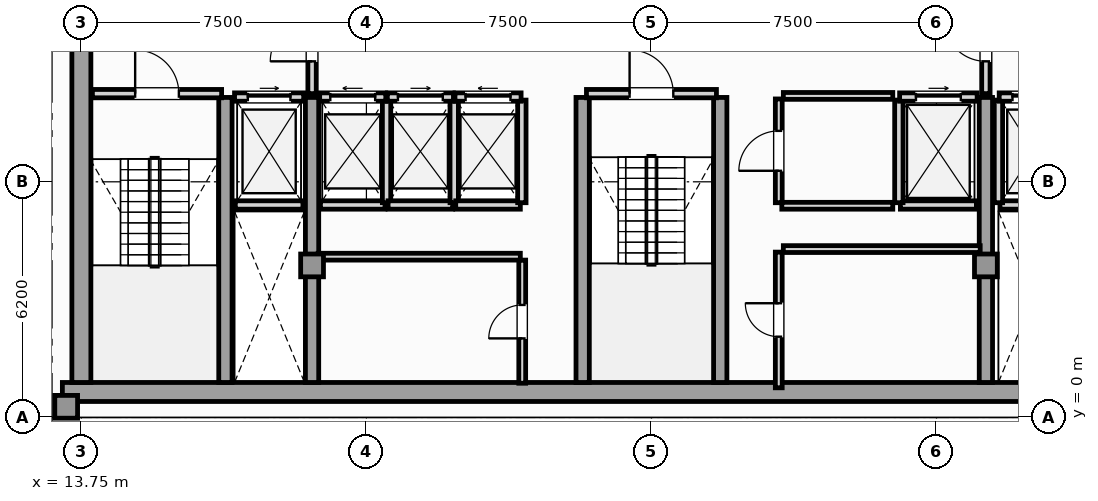
"""IFC4 building model, lengths in metres.
Left out: names, types, materials, properties, quantities, classifications, styles, units other than length and angle.
Written with IfcOpenShell. Run it as: python <this file> out.ifc"""

import sys

from ifc_helpers import new_model, si_unit, direction, frame, frame_2d, origin, origin_2d, place, context, subcontext, project, spatial, rectangle, extrude, element, fill, save


model = new_model("IFC4")
c1 = context("Model", 3, precision=1e-05, world=origin(), true_north=direction((0.0, 1.0)))
c2 = subcontext(c1, "Body", "Model", "MODEL_VIEW")
j1 = project(units=[si_unit("LENGTHUNIT", "METRE"), si_unit("PLANEANGLEUNIT", "RADIAN")], contexts=[c1])
p1 = place(None, origin())
s1 = spatial("IfcSite", under=j1, at=p1, CompositionType="ELEMENT")
p2 = place(p1, origin())
s2 = spatial("IfcBuilding", under=s1, at=p2, CompositionType="ELEMENT")
p3 = place(p2, frame((0.0, 0.0, 345.2)))
s3 = spatial("IfcBuildingStorey", under=s2, at=p3, CompositionType="ELEMENT", Elevation=345.2)
p4 = place(p3, frame((13.25, 0.67, 0.0), z_axis=(0.0, 0.0, 1.0), x_axis=(1.0, 0.0, 0.0)))
e1 = element("IfcWall", 1, at=p4, inside=s3, PredefinedType="SHEAR", context=c2, shape_type="SweptSolid", body=[
    extrude(rectangle(XDim=31.0, YDim=0.5, at=frame_2d((15.5, 0.0))), origin(), (0.0, 0.0, 1.0), 3.59),
])
p5 = place(p3, frame((13.75, 0.92, 0.0), z_axis=(0.0, 0.0, 1.0), x_axis=(0.0, 1.0, 0.0)))
e2 = element("IfcWall", 2, at=p5, inside=s3, PredefinedType="SHEAR", context=c2, shape_type="SweptSolid", body=[
    extrude(rectangle(XDim=10.53, YDim=0.5, at=frame_2d((5.265, 0.0))), origin(), (0.0, 0.0, 1.0), 3.59),
])
for number, where, z_axis, x_axis in (
    (3, (17.54, 0.92, 0.0), (0.0, 0.0, 1.0), (0.0, 1.0, 0.0)),
    (4, (19.82, 0.92, 0.0), (0.0, 0.0, 1.0), (0.0, 1.0, 0.0)),
    (5, (26.94, 0.92, 0.0), (0.0, 0.0, 1.0), (0.0, 1.0, 0.0)),
    (6, (30.56, 0.92, 0.0), (0.0, 0.0, 1.0), (0.0, 1.0, 0.0)),
    (7, (37.55, 0.92, 0.0), (0.0, 0.0, 1.0), (0.0, 1.0, 0.0)),
):
    element("IfcWall", number, at=place(p3, frame(where, z_axis=z_axis, x_axis=x_axis)), inside=s3, PredefinedType="SHEAR", context=c2, shape_type="SweptSolid", body=[
        extrude(rectangle(XDim=7.5, YDim=0.35, at=frame_2d((3.75, 0.0))), origin(), (0.0, 0.0, 1.0), 3.59),
    ])
for number, where, z_axis, x_axis in (
    (8, (13.35, 0.28, 0.0), (0.0, 0.0, 1.0), (1.0, 0.0, 0.0)),
    (9, (19.82, 4.0, 0.0), (0.0, 0.0, 1.0), (1.0, 0.0, 0.0)),
    (10, (37.55, 4.0, 0.0), (0.0, 0.0, 1.0), (1.0, 0.0, 0.0)),
):
    element("IfcColumn", number, at=place(p3, frame(where, z_axis=z_axis, x_axis=x_axis)), inside=s3, PredefinedType="COLUMN", context=c2, shape_type="SweptSolid", body=[
        extrude(rectangle(XDim=0.6, YDim=0.6, at=origin_2d()), origin(), (0.0, 0.0, 1.0), 3.85),
    ])
p6 = place(p3, frame((17.8, 5.59, 0.0), z_axis=(0.0, 0.0, 1.0), x_axis=(1.0, 0.0, 0.0)))
e11 = element("IfcWall", 11, at=p6, inside=s3, PredefinedType="SOLIDWALL", context=c2, shape_type="SweptSolid", body=[
    extrude(rectangle(XDim=1.78, YDim=0.22, at=frame_2d((0.89, 0.0))), origin(), (0.0, 0.0, 1.0), 3.59),
])
p7 = place(p3, frame((17.78, 8.43, 0.0), z_axis=(0.0, 0.0, 1.0), x_axis=(1.0, 0.0, 0.0)))
e12 = element("IfcWall", 12, at=p7, inside=s3, PredefinedType="SOLIDWALL", context=c2, shape_type="SweptSolid", body=[
    extrude(rectangle(XDim=1.82, YDim=0.22, at=frame_2d((0.91, 0.0))), origin(), (0.0, 0.0, 1.0), 3.59),
])
p8 = place(p7, frame((0.35, 0.0, 0.0)))
e13 = element("IfcOpeningElement", 13, at=p8, cuts=e12, PredefinedType="OPENING", context=c2, shape_type="SweptSolid", body=[
    extrude(rectangle(XDim=1.12, YDim=2.25, at=frame_2d((0.56, 1.125))), frame((0.0, 0.12, 0.0), z_axis=(0.0, -1.0, 0.0), x_axis=(1.0, 0.0, 0.0)), (0.0, 0.0, 1.0), 0.24),
])
p9 = place(p3, frame((37.92, 5.59, 0.0), z_axis=(0.0, 0.0, 1.0), x_axis=(1.0, 0.0, 0.0)))
e14 = element("IfcWall", 14, at=p9, inside=s3, PredefinedType="SOLIDWALL", context=c2, shape_type="SweptSolid", body=[
    extrude(rectangle(XDim=1.78, YDim=0.22, at=frame_2d((0.89, 0.0))), origin(), (0.0, 0.0, 1.0), 3.59),
])
p10 = place(p3, frame((37.88, 5.65, 0.0), z_axis=(0.0, 0.0, 1.0), x_axis=(0.0, 1.0, 0.0)))
e15 = element("IfcWall", 15, at=p10, inside=s3, PredefinedType="SOLIDWALL", context=c2, shape_type="SweptSolid", body=[
    extrude(rectangle(XDim=2.7, YDim=0.22, at=frame_2d((1.35, 0.0))), origin(), (0.0, 0.0, 1.0), 3.59),
])
p11 = place(p3, frame((37.9, 8.43, 0.0), z_axis=(0.0, 0.0, 1.0), x_axis=(1.0, 0.0, 0.0)))
e16 = element("IfcWall", 16, at=p11, inside=s3, PredefinedType="SOLIDWALL", context=c2, shape_type="SweptSolid", body=[
    extrude(rectangle(XDim=1.82, YDim=0.22, at=frame_2d((0.91, 0.0))), origin(), (0.0, 0.0, 1.0), 3.59),
])
p12 = place(p11, frame((0.35, 0.0, 0.0)))
e17 = element("IfcOpeningElement", 17, at=p12, cuts=e16, PredefinedType="OPENING", context=c2, shape_type="SweptSolid", body=[
    extrude(rectangle(XDim=1.12, YDim=2.25, at=frame_2d((0.56, 1.125))), frame((0.0, 0.12, 0.0), z_axis=(0.0, -1.0, 0.0), x_axis=(1.0, 0.0, 0.0)), (0.0, 0.0, 1.0), 0.24),
])
p13 = place(p3, frame((35.3, 5.59, 0.0), z_axis=(0.0, 0.0, 1.0), x_axis=(1.0, 0.0, 0.0)))
e18 = element("IfcWall", 18, at=p13, inside=s3, PredefinedType="SOLIDWALL", context=c2, shape_type="SweptSolid", body=[
    extrude(rectangle(XDim=2.0, YDim=0.22, at=frame_2d((1.0, 0.0))), origin(), (0.0, 0.0, 1.0), 3.59),
])
p14 = place(p3, frame((35.26, 5.65, 0.0), z_axis=(0.0, 0.0, 1.0), x_axis=(0.0, 1.0, 0.0)))
e19 = element("IfcWall", 19, at=p14, inside=s3, PredefinedType="SOLIDWALL", context=c2, shape_type="SweptSolid", body=[
    extrude(rectangle(XDim=2.7, YDim=0.22, at=frame_2d((1.35, 0.0))), origin(), (0.0, 0.0, 1.0), 3.59),
])
p15 = place(p3, frame((35.28, 8.43, 0.0), z_axis=(0.0, 0.0, 1.0), x_axis=(1.0, 0.0, 0.0)))
e20 = element("IfcWall", 20, at=p15, inside=s3, PredefinedType="SOLIDWALL", context=c2, shape_type="SweptSolid", body=[
    extrude(rectangle(XDim=2.04, YDim=0.22, at=frame_2d((1.02, 0.0))), origin(), (0.0, 0.0, 1.0), 3.59),
])
p16 = place(p15, frame((0.43, 0.0, 0.0)))
e21 = element("IfcOpeningElement", 21, at=p16, cuts=e20, PredefinedType="OPENING", context=c2, shape_type="SweptSolid", body=[
    extrude(rectangle(XDim=1.18, YDim=2.2, at=frame_2d((0.59, 1.1))), frame((0.0, 0.12, 0.0), z_axis=(0.0, -1.0, 0.0), x_axis=(1.0, 0.0, 0.0)), (0.0, 0.0, 1.0), 0.24),
])
p17 = place(p3, frame((20.04, 5.59, 0.0), z_axis=(0.0, 0.0, 1.0), x_axis=(1.0, 0.0, 0.0)))
e22 = element("IfcWall", 22, at=p17, inside=s3, PredefinedType="SOLIDWALL", context=c2, shape_type="SweptSolid", body=[
    extrude(rectangle(XDim=1.7, YDim=0.22, at=frame_2d((0.85, 0.0))), origin(), (0.0, 0.0, 1.0), 3.59),
])
p18 = place(p3, frame((21.78, 5.65, 0.0), z_axis=(0.0, 0.0, 1.0), x_axis=(0.0, 1.0, 0.0)))
e23 = element("IfcWall", 23, at=p18, inside=s3, PredefinedType="SOLIDWALL", context=c2, shape_type="SweptSolid", body=[
    extrude(rectangle(XDim=2.7, YDim=0.22, at=frame_2d((1.35, 0.0))), origin(), (0.0, 0.0, 1.0), 3.59),
])
p19 = place(p3, frame((20.02, 8.43, 0.0), z_axis=(0.0, 0.0, 1.0), x_axis=(1.0, 0.0, 0.0)))
e24 = element("IfcWall", 24, at=p19, inside=s3, PredefinedType="SOLIDWALL", context=c2, shape_type="SweptSolid", body=[
    extrude(rectangle(XDim=1.74, YDim=0.22, at=frame_2d((0.87, 0.0))), origin(), (0.0, 0.0, 1.0), 3.59),
])
p20 = place(p19, frame((0.28, 0.0, 0.0)))
e25 = element("IfcOpeningElement", 25, at=p20, cuts=e24, PredefinedType="OPENING", context=c2, shape_type="SweptSolid", body=[
    extrude(rectangle(XDim=1.18, YDim=2.2, at=frame_2d((0.59, 1.1))), frame((0.0, 0.12, 0.0), z_axis=(0.0, -1.0, 0.0), x_axis=(1.0, 0.0, 0.0)), (0.0, 0.0, 1.0), 0.24),
])
p21 = place(p3, frame((21.82, 5.59, 0.0), z_axis=(0.0, 0.0, 1.0), x_axis=(1.0, 0.0, 0.0)))
e26 = element("IfcWall", 26, at=p21, inside=s3, PredefinedType="SOLIDWALL", context=c2, shape_type="SweptSolid", body=[
    extrude(rectangle(XDim=1.7, YDim=0.22, at=frame_2d((0.85, 0.0))), origin(), (0.0, 0.0, 1.0), 3.59),
])
p22 = place(p3, frame((23.56, 5.65, 0.0), z_axis=(0.0, 0.0, 1.0), x_axis=(0.0, 1.0, 0.0)))
e27 = element("IfcWall", 27, at=p22, inside=s3, PredefinedType="SOLIDWALL", context=c2, shape_type="SweptSolid", body=[
    extrude(rectangle(XDim=2.7, YDim=0.22, at=frame_2d((1.35, 0.0))), origin(), (0.0, 0.0, 1.0), 3.59),
])
p23 = place(p3, frame((21.8, 8.43, 0.0), z_axis=(0.0, 0.0, 1.0), x_axis=(1.0, 0.0, 0.0)))
e28 = element("IfcWall", 28, at=p23, inside=s3, PredefinedType="SOLIDWALL", context=c2, shape_type="SweptSolid", body=[
    extrude(rectangle(XDim=1.74, YDim=0.22, at=frame_2d((0.87, 0.0))), origin(), (0.0, 0.0, 1.0), 3.59),
])
p24 = place(p23, frame((0.28, 0.0, 0.0)))
e29 = element("IfcOpeningElement", 29, at=p24, cuts=e28, PredefinedType="OPENING", context=c2, shape_type="SweptSolid", body=[
    extrude(rectangle(XDim=1.18, YDim=2.2, at=frame_2d((0.59, 1.1))), frame((0.0, 0.12, 0.0), z_axis=(0.0, -1.0, 0.0), x_axis=(1.0, 0.0, 0.0)), (0.0, 0.0, 1.0), 0.24),
])
p25 = place(p3, frame((23.6, 5.59, 0.0), z_axis=(0.0, 0.0, 1.0), x_axis=(1.0, 0.0, 0.0)))
e30 = element("IfcWall", 30, at=p25, inside=s3, PredefinedType="SOLIDWALL", context=c2, shape_type="SweptSolid", body=[
    extrude(rectangle(XDim=1.7, YDim=0.22, at=frame_2d((0.85, 0.0))), origin(), (0.0, 0.0, 1.0), 3.59),
])
p26 = place(p3, frame((25.34, 5.65, 0.0), z_axis=(0.0, 0.0, 1.0), x_axis=(0.0, 1.0, 0.0)))
e31 = element("IfcWall", 31, at=p26, inside=s3, PredefinedType="SOLIDWALL", context=c2, shape_type="SweptSolid", body=[
    extrude(rectangle(XDim=2.7, YDim=0.22, at=frame_2d((1.35, 0.0))), origin(), (0.0, 0.0, 1.0), 3.59),
])
p27 = place(p3, frame((23.58, 8.43, 0.0), z_axis=(0.0, 0.0, 1.0), x_axis=(1.0, 0.0, 0.0)))
e32 = element("IfcWall", 32, at=p27, inside=s3, PredefinedType="SOLIDWALL", context=c2, shape_type="SweptSolid", body=[
    extrude(rectangle(XDim=1.74, YDim=0.22, at=frame_2d((0.87, 0.0))), origin(), (0.0, 0.0, 1.0), 3.59),
])
p28 = place(p27, frame((0.28, 0.0, 0.0)))
e33 = element("IfcOpeningElement", 33, at=p28, cuts=e32, PredefinedType="OPENING", context=c2, shape_type="SweptSolid", body=[
    extrude(rectangle(XDim=1.18, YDim=2.2, at=frame_2d((0.59, 1.1))), frame((0.0, 0.12, 0.0), z_axis=(0.0, -1.0, 0.0), x_axis=(1.0, 0.0, 0.0)), (0.0, 0.0, 1.0), 0.24),
])
p29 = place(p3, frame((14.04, 8.52, 0.0), z_axis=(0.0, 0.0, 1.0), x_axis=(1.0, 0.0, 0.0)))
e34 = element("IfcWall", 34, at=p29, inside=s3, PredefinedType="SOLIDWALL", context=c2, shape_type="SweptSolid", body=[
    extrude(rectangle(XDim=3.4, YDim=0.22, at=frame_2d((1.7, 0.0))), origin(), (0.0, 0.0, 1.0), 3.59),
])
p30 = place(p29, frame((1.125, 0.0, 0.0)))
e35 = element("IfcOpeningElement", 35, at=p30, cuts=e34, PredefinedType="OPENING", context=c2, shape_type="SweptSolid", body=[
    extrude(rectangle(XDim=1.15, YDim=2.2, at=frame_2d((0.575, 1.1))), frame((0.0, 0.12, 0.0), z_axis=(0.0, -1.0, 0.0), x_axis=(1.0, 0.0, 0.0)), (0.0, 0.0, 1.0), 0.24),
])
p31 = place(p3, frame((27.04, 8.52, 0.0), z_axis=(0.0, 0.0, 1.0), x_axis=(1.0, 0.0, 0.0)))
e36 = element("IfcWall", 36, at=p31, inside=s3, PredefinedType="SOLIDWALL", context=c2, shape_type="SweptSolid", body=[
    extrude(rectangle(XDim=3.42, YDim=0.22, at=frame_2d((1.71, 0.0))), origin(), (0.0, 0.0, 1.0), 3.59),
])
p32 = place(p31, frame((1.135, 0.0, 0.0)))
e37 = element("IfcOpeningElement", 37, at=p32, cuts=e36, PredefinedType="OPENING", context=c2, shape_type="SweptSolid", body=[
    extrude(rectangle(XDim=1.15, YDim=2.2, at=frame_2d((0.575, 1.1))), frame((0.0, 0.12, 0.0), z_axis=(0.0, -1.0, 0.0), x_axis=(1.0, 0.0, 0.0)), (0.0, 0.0, 1.0), 0.24),
])
p33 = place(p3, frame((19.82, 8.52, 0.0), z_axis=(0.0, 0.0, 1.0), x_axis=(0.0, 1.0, 0.0)))
e38 = element("IfcWall", 38, at=p33, inside=s3, PredefinedType="SOLIDWALL", context=c2, shape_type="SweptSolid", body=[
    extrude(rectangle(XDim=2.8, YDim=0.22, at=frame_2d((1.4, 0.0))), origin(), (0.0, 0.0, 1.0), 3.046),
])
p34 = place(p33, frame((0.85, 0.0, 0.0)))
e39 = element("IfcOpeningElement", 39, at=p34, cuts=e38, PredefinedType="OPENING", context=c2, shape_type="SweptSolid", body=[
    extrude(rectangle(XDim=1.1, YDim=2.2, at=frame_2d((0.55, 1.1))), frame((0.0, 0.12, 0.0), z_axis=(0.0, -1.0, 0.0), x_axis=(1.0, 0.0, 0.0)), (0.0, 0.0, 1.0), 0.24),
])
p35 = place(p3, frame((37.55, 8.52, 0.0), z_axis=(0.0, 0.0, 1.0), x_axis=(0.0, 1.0, 0.0)))
e40 = element("IfcWall", 40, at=p35, inside=s3, PredefinedType="SOLIDWALL", context=c2, shape_type="SweptSolid", body=[
    extrude(rectangle(XDim=2.8, YDim=0.22, at=frame_2d((1.4, 0.0))), origin(), (0.0, 0.0, 1.0), 3.046),
])
p36 = place(p35, frame((0.85, 0.0, 0.0)))
e41 = element("IfcOpeningElement", 41, at=p36, cuts=e40, PredefinedType="OPENING", context=c2, shape_type="SweptSolid", body=[
    extrude(rectangle(XDim=1.1, YDim=2.2, at=frame_2d((0.55, 1.1))), frame((0.0, 0.12, 0.0), z_axis=(0.0, -1.0, 0.0), x_axis=(1.0, 0.0, 0.0)), (0.0, 0.0, 1.0), 0.24),
])
p37 = place(p3, frame((25.35, 0.9, 0.0), z_axis=(0.0, 0.0, 1.0), x_axis=(0.0, 1.0, 0.0)))
e42 = element("IfcWall", 42, at=p37, inside=s3, PredefinedType="PARTITIONING", context=c2, shape_type="SweptSolid", body=[
    extrude(rectangle(XDim=3.24, YDim=0.18, at=frame_2d((1.62, 0.0))), origin(), (0.0, 0.0, 1.0), 3.59),
])
p38 = place(p37, frame((1.18, 0.0, 0.0)))
e43 = element("IfcOpeningElement", 43, at=p38, cuts=e42, PredefinedType="OPENING", context=c2, shape_type="SweptSolid", body=[
    extrude(rectangle(XDim=0.88, YDim=2.05, at=frame_2d((0.44, 1.025))), frame((0.0, 0.1, 0.0), z_axis=(0.0, -1.0, 0.0), x_axis=(1.0, 0.0, 0.0)), (0.0, 0.0, 1.0), 0.2),
])
p39 = place(p3, frame((19.98, 4.23, 0.0), z_axis=(0.0, 0.0, 1.0), x_axis=(1.0, 0.0, 0.0)))
e44 = element("IfcWall", 44, at=p39, inside=s3, PredefinedType="PARTITIONING", context=c2, shape_type="SweptSolid", body=[
    extrude(rectangle(XDim=5.32, YDim=0.18, at=frame_2d((2.66, 0.0))), origin(), (0.0, 0.0, 1.0), 3.59),
])
p40 = place(p3, frame((32.1, 0.78, 0.0), z_axis=(0.0, 0.0, 1.0), x_axis=(0.0, 1.0, 0.0)))
e45 = element("IfcWall", 45, at=p40, inside=s3, PredefinedType="PARTITIONING", context=c2, shape_type="SweptSolid", body=[
    extrude(rectangle(XDim=3.57, YDim=0.18, at=frame_2d((1.785, 0.0))), origin(), (0.0, 0.0, 1.0), 3.59),
])
p41 = place(p40, frame((1.345, 0.0, 0.0)))
e46 = element("IfcOpeningElement", 46, at=p41, cuts=e45, PredefinedType="OPENING", context=c2, shape_type="SweptSolid", body=[
    extrude(rectangle(XDim=0.88, YDim=2.05, at=frame_2d((0.44, 1.025))), frame((0.0, 0.1, 0.0), z_axis=(0.0, -1.0, 0.0), x_axis=(1.0, 0.0, 0.0)), (0.0, 0.0, 1.0), 0.2),
])
p42 = place(p3, frame((32.22, 4.43, 0.0), z_axis=(0.0, 0.0, 1.0), x_axis=(1.0, 0.0, 0.0)))
e47 = element("IfcWall", 47, at=p42, inside=s3, PredefinedType="PARTITIONING", context=c2, shape_type="SweptSolid", body=[
    extrude(rectangle(XDim=5.18, YDim=0.18, at=frame_2d((2.59, 0.0))), origin(), (0.0, 0.0, 1.0), 3.59),
])
p43 = place(p3, frame((32.1, 5.65, 0.0), z_axis=(0.0, 0.0, 1.0), x_axis=(0.0, 1.0, 0.0)))
e48 = element("IfcWall", 48, at=p43, inside=s3, PredefinedType="PARTITIONING", context=c2, shape_type="SweptSolid", body=[
    extrude(rectangle(XDim=2.73, YDim=0.18, at=frame_2d((1.365, 0.0))), origin(), (0.0, 0.0, 1.0), 3.59),
])
p44 = place(p43, frame((0.84, 0.0, 0.0)))
e49 = element("IfcOpeningElement", 49, at=p44, cuts=e48, PredefinedType="OPENING", context=c2, shape_type="SweptSolid", body=[
    extrude(rectangle(XDim=1.05, YDim=2.15, at=frame_2d((0.525, 1.075))), frame((0.0, 0.1, 0.0), z_axis=(0.0, -1.0, 0.0), x_axis=(1.0, 0.0, 0.0)), (0.0, 0.0, 1.0), 0.2),
])
p45 = place(p3, frame((32.22, 8.46, 0.0), z_axis=(0.0, 0.0, 1.0), x_axis=(1.0, 0.0, 0.0)))
e50 = element("IfcWall", 50, at=p45, inside=s3, PredefinedType="PARTITIONING", context=c2, shape_type="SweptSolid", body=[
    extrude(rectangle(XDim=2.88, YDim=0.18, at=frame_2d((1.44, 0.0))), origin(), (0.0, 0.0, 1.0), 3.59),
])
p46 = place(p3, frame((32.18, 5.57, 0.0), z_axis=(0.0, 0.0, 1.0), x_axis=(1.0, 0.0, 0.0)))
e51 = element("IfcWall", 51, at=p46, inside=s3, PredefinedType="PARTITIONING", context=c2, shape_type="SweptSolid", body=[
    extrude(rectangle(XDim=2.92, YDim=0.18, at=frame_2d((1.46, 0.0))), origin(), (0.0, 0.0, 1.0), 3.59),
])
p47 = place(p8, origin())
e52 = element("IfcDoor", 52, at=p47, inside=s3, OperationType="SLIDING_TO_RIGHT", PredefinedType="DOOR", context=c2, shape_type="SweptSolid", body=[
    extrude(rectangle(XDim=1.12, YDim=2.25, at=frame_2d((0.56, 1.125))), frame((0.0, 0.025, 0.0), z_axis=(0.0, -1.0, 0.0), x_axis=(1.0, 0.0, 0.0)), (0.0, 0.0, 1.0), 0.05),
])
fill(e13, e52)
p48 = place(p12, origin())
e53 = element("IfcDoor", 53, at=p48, inside=s3, OperationType="SLIDING_TO_LEFT", PredefinedType="DOOR", context=c2, shape_type="SweptSolid", body=[
    extrude(rectangle(XDim=1.12, YDim=2.25, at=frame_2d((0.56, 1.125))), frame((0.0, 0.025, 0.0), z_axis=(0.0, -1.0, 0.0), x_axis=(1.0, 0.0, 0.0)), (0.0, 0.0, 1.0), 0.05),
])
fill(e17, e53)
p49 = place(p16, origin())
e54 = element("IfcDoor", 54, at=p49, inside=s3, OperationType="SLIDING_TO_RIGHT", PredefinedType="DOOR", context=c2, shape_type="SweptSolid", body=[
    extrude(rectangle(XDim=1.18, YDim=2.2, at=frame_2d((0.59, 1.1))), frame((0.0, 0.025, 0.0), z_axis=(0.0, -1.0, 0.0), x_axis=(1.0, 0.0, 0.0)), (0.0, 0.0, 1.0), 0.05),
])
fill(e21, e54)
p50 = place(p20, origin())
e55 = element("IfcDoor", 55, at=p50, inside=s3, OperationType="SLIDING_TO_LEFT", PredefinedType="DOOR", context=c2, shape_type="SweptSolid", body=[
    extrude(rectangle(XDim=1.18, YDim=2.2, at=frame_2d((0.59, 1.1))), frame((0.0, 0.025, 0.0), z_axis=(0.0, -1.0, 0.0), x_axis=(1.0, 0.0, 0.0)), (0.0, 0.0, 1.0), 0.05),
])
fill(e25, e55)
p51 = place(p24, origin())
e56 = element("IfcDoor", 56, at=p51, inside=s3, OperationType="SLIDING_TO_RIGHT", PredefinedType="DOOR", context=c2, shape_type="SweptSolid", body=[
    extrude(rectangle(XDim=1.18, YDim=2.2, at=frame_2d((0.59, 1.1))), frame((0.0, 0.025, 0.0), z_axis=(0.0, -1.0, 0.0), x_axis=(1.0, 0.0, 0.0)), (0.0, 0.0, 1.0), 0.05),
])
fill(e29, e56)
p52 = place(p28, origin())
e57 = element("IfcDoor", 57, at=p52, inside=s3, OperationType="SLIDING_TO_LEFT", PredefinedType="DOOR", context=c2, shape_type="SweptSolid", body=[
    extrude(rectangle(XDim=1.18, YDim=2.2, at=frame_2d((0.59, 1.1))), frame((0.0, 0.025, 0.0), z_axis=(0.0, -1.0, 0.0), x_axis=(1.0, 0.0, 0.0)), (0.0, 0.0, 1.0), 0.05),
])
fill(e33, e57)
p53 = place(p30, origin())
e58 = element("IfcDoor", 58, at=p53, inside=s3, OperationType="SINGLE_SWING_LEFT", PredefinedType="DOOR", context=c2, shape_type="SweptSolid", body=[
    extrude(rectangle(XDim=1.15, YDim=2.2, at=frame_2d((0.575, 1.1))), frame((0.0, 0.025, 0.0), z_axis=(0.0, -1.0, 0.0), x_axis=(1.0, 0.0, 0.0)), (0.0, 0.0, 1.0), 0.05),
])
fill(e35, e58)
p54 = place(p32, origin())
e59 = element("IfcDoor", 59, at=p54, inside=s3, OperationType="SINGLE_SWING_LEFT", PredefinedType="DOOR", context=c2, shape_type="SweptSolid", body=[
    extrude(rectangle(XDim=1.15, YDim=2.2, at=frame_2d((0.575, 1.1))), frame((0.0, 0.025, 0.0), z_axis=(0.0, -1.0, 0.0), x_axis=(1.0, 0.0, 0.0)), (0.0, 0.0, 1.0), 0.05),
])
fill(e37, e59)
p55 = place(p34, origin())
e60 = element("IfcDoor", 60, at=p55, inside=s3, OperationType="SINGLE_SWING_LEFT", PredefinedType="DOOR", context=c2, shape_type="SweptSolid", body=[
    extrude(rectangle(XDim=1.1, YDim=2.2, at=frame_2d((0.55, 1.1))), frame((0.0, 0.025, 0.0), z_axis=(0.0, -1.0, 0.0), x_axis=(1.0, 0.0, 0.0)), (0.0, 0.0, 1.0), 0.05),
])
fill(e39, e60)
p56 = place(p36, origin())
e61 = element("IfcDoor", 61, at=p56, inside=s3, OperationType="SINGLE_SWING_RIGHT", PredefinedType="DOOR", context=c2, shape_type="SweptSolid", body=[
    extrude(rectangle(XDim=1.1, YDim=2.2, at=frame_2d((0.55, 1.1))), frame((0.0, 0.025, 0.0), z_axis=(0.0, -1.0, 0.0), x_axis=(1.0, 0.0, 0.0)), (0.0, 0.0, 1.0), 0.05),
])
fill(e41, e61)
p57 = place(p38, origin())
e62 = element("IfcDoor", 62, at=p57, inside=s3, OperationType="SINGLE_SWING_LEFT", PredefinedType="DOOR", context=c2, shape_type="SweptSolid", body=[
    extrude(rectangle(XDim=0.88, YDim=2.05, at=frame_2d((0.44, 1.025))), frame((0.0, 0.025, 0.0), z_axis=(0.0, -1.0, 0.0), x_axis=(1.0, 0.0, 0.0)), (0.0, 0.0, 1.0), 0.05),
])
fill(e43, e62)
p58 = place(p41, origin())
e63 = element("IfcDoor", 63, at=p58, inside=s3, OperationType="SINGLE_SWING_RIGHT", PredefinedType="DOOR", context=c2, shape_type="SweptSolid", body=[
    extrude(rectangle(XDim=0.88, YDim=2.05, at=frame_2d((0.44, 1.025))), frame((0.0, 0.025, 0.0), z_axis=(0.0, -1.0, 0.0), x_axis=(1.0, 0.0, 0.0)), (0.0, 0.0, 1.0), 0.05),
])
fill(e46, e63)
p59 = place(p44, origin())
e64 = element("IfcDoor", 64, at=p59, inside=s3, OperationType="SINGLE_SWING_LEFT", PredefinedType="DOOR", context=c2, shape_type="SweptSolid", body=[
    extrude(rectangle(XDim=1.05, YDim=2.15, at=frame_2d((0.525, 1.075))), frame((0.0, 0.025, 0.0), z_axis=(0.0, -1.0, 0.0), x_axis=(1.0, 0.0, 0.0)), (0.0, 0.0, 1.0), 0.05),
])
fill(e49, e64)
save(model, sys.argv[1])
